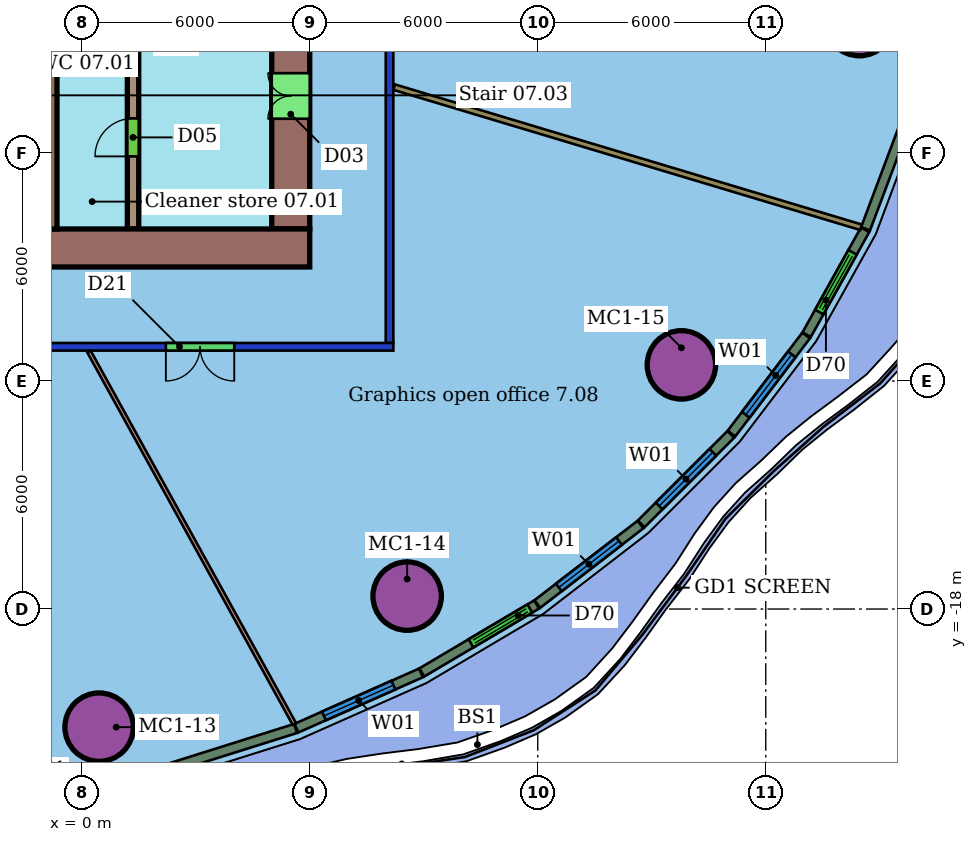
"""IFC4 building model, lengths in metres.
Left out: names, types, materials, properties, quantities, classifications, styles, units other than length and angle.
Written with IfcOpenShell. Run it as: python <this file> out.ifc"""

import sys

from ifc_helpers import new_model, si_unit, direction, frame, frame_2d, origin, origin_2d, place, context, subcontext, project, spatial, rectangle, hollow_circle, extrude, element, fill, save


model = new_model("IFC4")
c1 = context("Model", 3, precision=1e-05, world=origin(), true_north=direction((0.0, 1.0)))
c2 = subcontext(c1, "Body", "Model", "MODEL_VIEW")
j1 = project(units=[si_unit("LENGTHUNIT", "METRE"), si_unit("PLANEANGLEUNIT", "RADIAN")], contexts=[c1])
p1 = place(None, origin())
s1 = spatial("IfcSite", under=j1, at=p1, CompositionType="ELEMENT")
p2 = place(p1, origin())
s2 = spatial("IfcBuilding", under=s1, at=p2, CompositionType="ELEMENT")
p3 = place(p2, frame((0.0, 0.0, 43.4)))
s3 = spatial("IfcBuildingStorey", under=s2, at=p3, CompositionType="ELEMENT", Elevation=43.4)
for number, where, z_axis, x_axis in (
    (1, (0.458, -21.108, 0.0), (0.0, 0.0, 1.0), (1.0, 0.0, 0.0)),
    (2, (8.563, -17.66, 0.0), (0.0, 0.0, 1.0), (1.0, 0.0, 0.0)),
    (3, (15.78, -11.576, 0.0), (0.0, 0.0, 1.0), (1.0, 0.0, 0.0)),
    (4, (20.464, -2.543, 0.0), (0.0, 0.0, 1.0), (1.0, 0.0, 0.0)),
):
    element("IfcColumn", number, at=place(p3, frame(where, z_axis=z_axis, x_axis=x_axis)), inside=s3, PredefinedType="COLUMN", context=c2, shape_type="SweptSolid", body=[
        extrude(hollow_circle(Radius=0.9, WallThickness=0.06, at=origin_2d()), origin(), (0.0, 0.0, 1.0), 3.55),
    ])
p4 = place(p3, frame((8.2, -11.1, 0.0), z_axis=(0.0, 0.0, 1.0), x_axis=(-1.0, 0.0, 0.0)))
e5 = element("IfcWall", 5, at=p4, inside=s3, PredefinedType="PARTITIONING", context=c2, shape_type="SweptSolid", body=[
    extrude(rectangle(XDim=28.4, YDim=0.2, at=frame_2d((14.2, 0.0))), origin(), (0.0, 0.0, 1.0), 2.85),
])
p5 = place(p4, frame((11.713, 0.0, 0.0)))
e6 = element("IfcOpeningElement", 6, at=p5, cuts=e5, PredefinedType="OPENING", context=c2, shape_type="SweptSolid", body=[
    extrude(rectangle(XDim=1.8, YDim=2.1, at=frame_2d((0.9, 1.05))), frame((0.0, 0.11, 0.0), z_axis=(0.0, -1.0, 0.0), x_axis=(1.0, 0.0, 0.0)), (0.0, 0.0, 1.0), 0.22),
])
p6 = place(p4, frame((4.186, 0.0, 0.0)))
e7 = element("IfcOpeningElement", 7, at=p6, cuts=e5, PredefinedType="OPENING", context=c2, shape_type="SweptSolid", body=[
    extrude(rectangle(XDim=1.8, YDim=2.1, at=frame_2d((0.9, 1.05))), frame((0.0, 0.11, 0.0), z_axis=(0.0, -1.0, 0.0), x_axis=(1.0, 0.0, 0.0)), (0.0, 0.0, 1.0), 0.22),
])
p7 = place(p3, frame((8.1, 11.0, 0.0), z_axis=(0.0, 0.0, 1.0), x_axis=(0.0, -1.0, 0.0)))
e8 = element("IfcWall", 8, at=p7, inside=s3, PredefinedType="PARTITIONING", context=c2, shape_type="SweptSolid", body=[
    extrude(rectangle(XDim=22.0, YDim=0.2, at=frame_2d((11.0, 0.0))), origin(), (0.0, 0.0, 1.0), 2.85),
])
p8 = place(p7, frame((5.764, 0.0, 0.0)))
e9 = element("IfcOpeningElement", 9, at=p8, cuts=e8, PredefinedType="OPENING", context=c2, shape_type="SweptSolid", body=[
    extrude(rectangle(XDim=1.1, YDim=2.1, at=frame_2d((0.55, 1.05))), frame((0.0, 0.11, 0.0), z_axis=(0.0, -1.0, 0.0), x_axis=(1.0, 0.0, 0.0)), (0.0, 0.0, 1.0), 0.22),
])
p9 = place(p7, frame((12.552, 0.0, 0.0)))
e10 = element("IfcOpeningElement", 10, at=p9, cuts=e8, PredefinedType="OPENING", context=c2, shape_type="SweptSolid", body=[
    extrude(rectangle(XDim=0.9, YDim=2.1, at=frame_2d((0.45, 1.05))), frame((0.0, 0.11, 0.0), z_axis=(0.0, -1.0, 0.0), x_axis=(1.0, 0.0, 0.0)), (0.0, 0.0, 1.0), 0.22),
])
p10 = place(p3, frame((5.595, -21.023, 0.0), z_axis=(0.0, 0.0, 1.0), x_axis=(-0.482952757362, 0.875646409321, 0.0)))
e11 = element("IfcWall", 11, at=p10, inside=s3, PredefinedType="PARTITIONING", context=c2, shape_type="SweptSolid", body=[
    extrude(rectangle(XDim=11.19, YDim=0.1, at=frame_2d((5.595, 0.0))), origin(), (0.0, 0.0, 1.0), 3.55),
])
p11 = place(p3, frame((20.508, -7.955, 0.0), z_axis=(0.0, 0.0, 1.0), x_axis=(-0.957795897573, 0.287449158275, 0.0)))
e12 = element("IfcWall", 12, at=p11, inside=s3, PredefinedType="PARTITIONING", context=c2, shape_type="SweptSolid", body=[
    extrude(rectangle(XDim=12.827, YDim=0.15, at=frame_2d((6.414, 0.0))), origin(), (0.0, 0.0, 1.0), 3.55),
])
p12 = place(p3, frame((2.191, -22.224, 0.0), z_axis=(0.0, 0.0, 1.0), x_axis=(0.953906738278, 0.300103206694, 0.0)))
e13 = element("IfcWall", 13, at=p12, inside=s3, PredefinedType="SOLIDWALL", context=c2, shape_type="SweptSolid", body=[
    extrude(rectangle(XDim=3.603, YDim=0.25, at=frame_2d((1.802, 0.0))), origin(), (0.0, 0.0, 1.0), 3.15),
])
p13 = place(p3, frame((5.649, -21.135, 0.0), z_axis=(0.0, 0.0, 1.0), x_axis=(0.914061167201, 0.405576358552, 0.0)))
e14 = element("IfcWall", 14, at=p13, inside=s3, PredefinedType="SOLIDWALL", context=c2, shape_type="SweptSolid", body=[
    extrude(rectangle(XDim=3.587, YDim=0.25, at=frame_2d((1.793, 0.0))), origin(), (0.0, 0.0, 1.0), 3.15),
])
p14 = place(p13, frame((0.793, 0.0, 0.8)))
e15 = element("IfcOpeningElement", 15, at=p14, cuts=e14, PredefinedType="OPENING", context=c2, shape_type="SweptSolid", body=[
    extrude(rectangle(XDim=2.0, YDim=2.2, at=frame_2d((1.0, 1.1))), frame((0.0, 0.135, 0.0), z_axis=(0.0, -1.0, 0.0), x_axis=(1.0, 0.0, 0.0)), (0.0, 0.0, 1.0), 0.27),
])
p15 = place(p3, frame((8.948, -19.67, 0.0), z_axis=(0.0, 0.0, 1.0), x_axis=(0.860556783273, 0.509354515796, 0.0)))
e16 = element("IfcWall", 16, at=p15, inside=s3, PredefinedType="SOLIDWALL", context=c2, shape_type="SweptSolid", body=[
    extrude(rectangle(XDim=3.512, YDim=0.25, at=frame_2d((1.756, 0.0))), origin(), (0.0, 0.0, 1.0), 3.15),
])
p16 = place(p15, frame((1.506, 0.0, 0.0)))
e17 = element("IfcOpeningElement", 17, at=p16, cuts=e16, PredefinedType="OPENING", context=c2, shape_type="SweptSolid", body=[
    extrude(rectangle(XDim=1.8, YDim=2.4, at=frame_2d((0.9, 1.2))), frame((0.0, 0.135, 0.0), z_axis=(0.0, -1.0, 0.0), x_axis=(1.0, 0.0, 0.0)), (0.0, 0.0, 1.0), 0.27),
])
p17 = place(p3, frame((11.99, -17.868, 0.0), z_axis=(0.0, 0.0, 1.0), x_axis=(0.792064745515, 0.610437088415, 0.0)))
e18 = element("IfcWall", 18, at=p17, inside=s3, PredefinedType="SOLIDWALL", context=c2, shape_type="SweptSolid", body=[
    extrude(rectangle(XDim=3.426, YDim=0.25, at=frame_2d((1.713, 0.0))), origin(), (0.0, 0.0, 1.0), 3.15),
])
p18 = place(p17, frame((0.713, 0.0, 0.8)))
e19 = element("IfcOpeningElement", 19, at=p18, cuts=e18, PredefinedType="OPENING", context=c2, shape_type="SweptSolid", body=[
    extrude(rectangle(XDim=2.0, YDim=2.2, at=frame_2d((1.0, 1.1))), frame((0.0, 0.135, 0.0), z_axis=(0.0, -1.0, 0.0), x_axis=(1.0, 0.0, 0.0)), (0.0, 0.0, 1.0), 0.27),
])
p19 = place(p3, frame((14.721, -15.761, 0.0), z_axis=(0.0, 0.0, 1.0), x_axis=(0.707362946123, 0.706850523415, 0.0)))
e20 = element("IfcWall", 20, at=p19, inside=s3, PredefinedType="SOLIDWALL", context=c2, shape_type="SweptSolid", body=[
    extrude(rectangle(XDim=3.335, YDim=0.25, at=frame_2d((1.667, 0.0))), origin(), (0.0, 0.0, 1.0), 3.15),
])
p20 = place(p19, frame((0.668, 0.0, 0.8)))
e21 = element("IfcOpeningElement", 21, at=p20, cuts=e20, PredefinedType="OPENING", context=c2, shape_type="SweptSolid", body=[
    extrude(rectangle(XDim=2.0, YDim=2.2, at=frame_2d((1.0, 1.1))), frame((0.0, 0.135, 0.0), z_axis=(0.0, -1.0, 0.0), x_axis=(1.0, 0.0, 0.0)), (0.0, 0.0, 1.0), 0.27),
])
p21 = place(p3, frame((17.097, -13.385, 0.0), z_axis=(0.0, 0.0, 1.0), x_axis=(0.605655469581, 0.795726996002, 0.0)))
e22 = element("IfcWall", 22, at=p21, inside=s3, PredefinedType="SOLIDWALL", context=c2, shape_type="SweptSolid", body=[
    extrude(rectangle(XDim=3.245, YDim=0.25, at=frame_2d((1.622, 0.0))), origin(), (0.0, 0.0, 1.0), 3.15),
])
p22 = place(p21, frame((0.622, 0.0, 0.8)))
e23 = element("IfcOpeningElement", 23, at=p22, cuts=e22, PredefinedType="OPENING", context=c2, shape_type="SweptSolid", body=[
    extrude(rectangle(XDim=2.0, YDim=2.2, at=frame_2d((1.0, 1.1))), frame((0.0, 0.135, 0.0), z_axis=(0.0, -1.0, 0.0), x_axis=(1.0, 0.0, 0.0)), (0.0, 0.0, 1.0), 0.27),
])
p23 = place(p3, frame((19.076, -10.781, 0.0), z_axis=(0.0, 0.0, 1.0), x_axis=(0.486652480259, 0.873595652152, 0.0)))
e24 = element("IfcWall", 24, at=p23, inside=s3, PredefinedType="SOLIDWALL", context=c2, shape_type="SweptSolid", body=[
    extrude(rectangle(XDim=3.161, YDim=0.25, at=frame_2d((1.581, 0.0))), origin(), (0.0, 0.0, 1.0), 3.15),
])
p24 = place(p23, frame((0.681, 0.0, 0.0)))
e25 = element("IfcOpeningElement", 25, at=p24, cuts=e24, PredefinedType="OPENING", context=c2, shape_type="SweptSolid", body=[
    extrude(rectangle(XDim=1.8, YDim=2.4, at=frame_2d((0.9, 1.2))), frame((0.0, 0.135, 0.0), z_axis=(0.0, -1.0, 0.0), x_axis=(1.0, 0.0, 0.0)), (0.0, 0.0, 1.0), 0.27),
])
p25 = place(p3, frame((20.626, -7.995, 0.0), z_axis=(0.0, 0.0, 1.0), x_axis=(0.351570793039, 0.936161298859, 0.0)))
e26 = element("IfcWall", 26, at=p25, inside=s3, PredefinedType="SOLIDWALL", context=c2, shape_type="SweptSolid", body=[
    extrude(rectangle(XDim=3.05, YDim=0.25, at=frame_2d((1.525, 0.0))), origin(), (0.0, 0.0, 1.0), 3.15),
])
p26 = place(p3, frame((-18.0, -8.5, 0.0), z_axis=(0.0, 0.0, 1.0), x_axis=(1.0, 0.0, 0.0)))
e27 = element("IfcWall", 27, at=p26, inside=s3, PredefinedType="SHEAR", context=c2, shape_type="SweptSolid", body=[
    extrude(rectangle(XDim=24.0, YDim=1.0, at=frame_2d((12.0, 0.0))), origin(), (0.0, 0.0, 1.0), 3.4),
])
p27 = place(p26, frame((6.0, 0.0, 0.0)))
e28 = element("IfcOpeningElement", 28, at=p27, cuts=e27, PredefinedType="OPENING", context=c2, shape_type="SweptSolid", body=[
    extrude(rectangle(XDim=1.2, YDim=2.1, at=frame_2d((0.6, 1.05))), frame((0.0, 0.51, 0.0), z_axis=(0.0, -1.0, 0.0), x_axis=(1.0, 0.0, 0.0)), (0.0, 0.0, 1.0), 1.02),
])
p28 = place(p3, frame((5.5, -8.0, 0.0), z_axis=(0.0, 0.0, 1.0), x_axis=(0.0, 1.0, 0.0)))
e29 = element("IfcWall", 29, at=p28, inside=s3, PredefinedType="SHEAR", context=c2, shape_type="SweptSolid", body=[
    extrude(rectangle(XDim=16.0, YDim=1.0, at=frame_2d((8.0, 0.0))), origin(), (0.0, 0.0, 1.0), 3.4),
])
p29 = place(p28, frame((2.9, 0.0, 0.0)))
e30 = element("IfcOpeningElement", 30, at=p29, cuts=e29, PredefinedType="OPENING", context=c2, shape_type="SweptSolid", body=[
    extrude(rectangle(XDim=1.2, YDim=2.1, at=frame_2d((0.6, 1.05))), frame((0.0, 0.51, 0.0), z_axis=(0.0, -1.0, 0.0), x_axis=(1.0, 0.0, 0.0)), (0.0, 0.0, 1.0), 1.02),
])
p30 = place(p28, frame((11.9, 0.0, 0.0)))
e31 = element("IfcOpeningElement", 31, at=p30, cuts=e29, PredefinedType="OPENING", context=c2, shape_type="SweptSolid", body=[
    extrude(rectangle(XDim=1.2, YDim=2.1, at=frame_2d((0.6, 1.05))), frame((0.0, 0.51, 0.0), z_axis=(0.0, -1.0, 0.0), x_axis=(1.0, 0.0, 0.0)), (0.0, 0.0, 1.0), 1.02),
])
p31 = place(p3, frame((-6.0, -3.58, 0.0), z_axis=(0.0, 0.0, 1.0), x_axis=(1.0, 0.0, 0.0)))
e32 = element("IfcWall", 32, at=p31, inside=s3, PredefinedType="SHEAR", context=c2, shape_type="SweptSolid", body=[
    extrude(rectangle(XDim=7.2, YDim=0.6, at=frame_2d((3.6, 0.0))), origin(), (0.0, 0.0, 1.0), 3.4),
])
p32 = place(p3, frame((1.35, -8.0, 0.0), z_axis=(0.0, 0.0, 1.0), x_axis=(0.0, 1.0, 0.0)))
e33 = element("IfcWall", 33, at=p32, inside=s3, PredefinedType="SHEAR", context=c2, shape_type="SweptSolid", body=[
    extrude(rectangle(XDim=16.0, YDim=0.3, at=frame_2d((8.0, 0.0))), origin(), (0.0, 0.0, 1.0), 3.4),
])
p33 = place(p32, frame((1.91, 0.0, 0.0)))
e34 = element("IfcOpeningElement", 34, at=p33, cuts=e33, PredefinedType="OPENING", context=c2, shape_type="SweptSolid", body=[
    extrude(rectangle(XDim=1.0, YDim=2.1, at=frame_2d((0.5, 1.05))), frame((0.0, 0.16, 0.0), z_axis=(0.0, -1.0, 0.0), x_axis=(1.0, 0.0, 0.0)), (0.0, 0.0, 1.0), 0.32),
])
p34 = place(p32, frame((7.25, 0.0, 0.0)))
e35 = element("IfcOpeningElement", 35, at=p34, cuts=e33, PredefinedType="OPENING", context=c2, shape_type="SweptSolid", body=[
    extrude(rectangle(XDim=1.5, YDim=2.1, at=frame_2d((0.75, 1.05))), frame((0.0, 0.16, 0.0), z_axis=(0.0, -1.0, 0.0), x_axis=(1.0, 0.0, 0.0)), (0.0, 0.0, 1.0), 0.32),
])
p35 = place(p3, frame((-0.85, -3.88, 0.0), z_axis=(0.0, 0.0, 1.0), x_axis=(0.0, -1.0, 0.0)))
e36 = element("IfcWall", 36, at=p35, inside=s3, PredefinedType="SHEAR", context=c2, shape_type="SweptSolid", body=[
    extrude(rectangle(XDim=4.12, YDim=0.4, at=frame_2d((2.06, 0.0))), origin(), (0.0, 0.0, 1.0), 3.4),
])
p36 = place(p6, origin())
e37 = element("IfcDoor", 37, at=p36, inside=s3, OperationType="DOUBLE_DOOR_SINGLE_SWING", PredefinedType="DOOR", context=c2, shape_type="SweptSolid", body=[
    extrude(rectangle(XDim=1.8, YDim=2.1, at=frame_2d((0.9, 1.05))), frame((0.0, 0.025, 0.0), z_axis=(0.0, -1.0, 0.0), x_axis=(1.0, 0.0, 0.0)), (0.0, 0.0, 1.0), 0.05),
])
fill(e7, e37)
p37 = place(p14, origin())
e38 = element("IfcWindow", 38, at=p37, inside=s3, PartitioningType="SINGLE_PANEL", PredefinedType="WINDOW", context=c2, shape_type="SweptSolid", body=[
    extrude(rectangle(XDim=2.0, YDim=2.2, at=frame_2d((1.0, 1.1))), frame((0.0, 0.03, 0.0), z_axis=(0.0, -1.0, 0.0), x_axis=(1.0, 0.0, 0.0)), (0.0, 0.0, 1.0), 0.06),
])
fill(e15, e38)
p38 = place(p16, origin())
e39 = element("IfcDoor", 39, at=p38, inside=s3, OperationType="DOUBLE_DOOR_SLIDING", PredefinedType="DOOR", context=c2, shape_type="SweptSolid", body=[
    extrude(rectangle(XDim=1.8, YDim=2.4, at=frame_2d((0.9, 1.2))), frame((0.0, 0.025, 0.0), z_axis=(0.0, -1.0, 0.0), x_axis=(1.0, 0.0, 0.0)), (0.0, 0.0, 1.0), 0.05),
])
fill(e17, e39)
p39 = place(p18, origin())
e40 = element("IfcWindow", 40, at=p39, inside=s3, PartitioningType="SINGLE_PANEL", PredefinedType="WINDOW", context=c2, shape_type="SweptSolid", body=[
    extrude(rectangle(XDim=2.0, YDim=2.2, at=frame_2d((1.0, 1.1))), frame((0.0, 0.03, 0.0), z_axis=(0.0, -1.0, 0.0), x_axis=(1.0, 0.0, 0.0)), (0.0, 0.0, 1.0), 0.06),
])
fill(e19, e40)
p40 = place(p20, origin())
e41 = element("IfcWindow", 41, at=p40, inside=s3, PartitioningType="SINGLE_PANEL", PredefinedType="WINDOW", context=c2, shape_type="SweptSolid", body=[
    extrude(rectangle(XDim=2.0, YDim=2.2, at=frame_2d((1.0, 1.1))), frame((0.0, 0.03, 0.0), z_axis=(0.0, -1.0, 0.0), x_axis=(1.0, 0.0, 0.0)), (0.0, 0.0, 1.0), 0.06),
])
fill(e21, e41)
p41 = place(p22, origin())
e42 = element("IfcWindow", 42, at=p41, inside=s3, PartitioningType="SINGLE_PANEL", PredefinedType="WINDOW", context=c2, shape_type="SweptSolid", body=[
    extrude(rectangle(XDim=2.0, YDim=2.2, at=frame_2d((1.0, 1.1))), frame((0.0, 0.03, 0.0), z_axis=(0.0, -1.0, 0.0), x_axis=(1.0, 0.0, 0.0)), (0.0, 0.0, 1.0), 0.06),
])
fill(e23, e42)
p42 = place(p24, origin())
e43 = element("IfcDoor", 43, at=p42, inside=s3, OperationType="DOUBLE_DOOR_SLIDING", PredefinedType="DOOR", context=c2, shape_type="SweptSolid", body=[
    extrude(rectangle(XDim=1.8, YDim=2.4, at=frame_2d((0.9, 1.2))), frame((0.0, 0.025, 0.0), z_axis=(0.0, -1.0, 0.0), x_axis=(1.0, 0.0, 0.0)), (0.0, 0.0, 1.0), 0.05),
])
fill(e25, e43)
p43 = place(p29, origin())
e44 = element("IfcDoor", 44, at=p43, inside=s3, OperationType="DOUBLE_DOOR_SINGLE_SWING", PredefinedType="NOTDEFINED", context=c2, shape_type="SweptSolid", body=[
    extrude(rectangle(XDim=1.2, YDim=2.1, at=frame_2d((0.6, 1.05))), frame((0.0, 0.025, 0.0), z_axis=(0.0, -1.0, 0.0), x_axis=(1.0, 0.0, 0.0)), (0.0, 0.0, 1.0), 0.05),
])
fill(e30, e44)
p44 = place(p33, origin())
e45 = element("IfcDoor", 45, at=p44, inside=s3, OperationType="SINGLE_SWING_LEFT", PredefinedType="NOTDEFINED", context=c2, shape_type="SweptSolid", body=[
    extrude(rectangle(XDim=1.0, YDim=2.1, at=frame_2d((0.5, 1.05))), frame((0.0, 0.025, 0.0), z_axis=(0.0, -1.0, 0.0), x_axis=(1.0, 0.0, 0.0)), (0.0, 0.0, 1.0), 0.05),
])
fill(e34, e45)
save(model, sys.argv[1])
